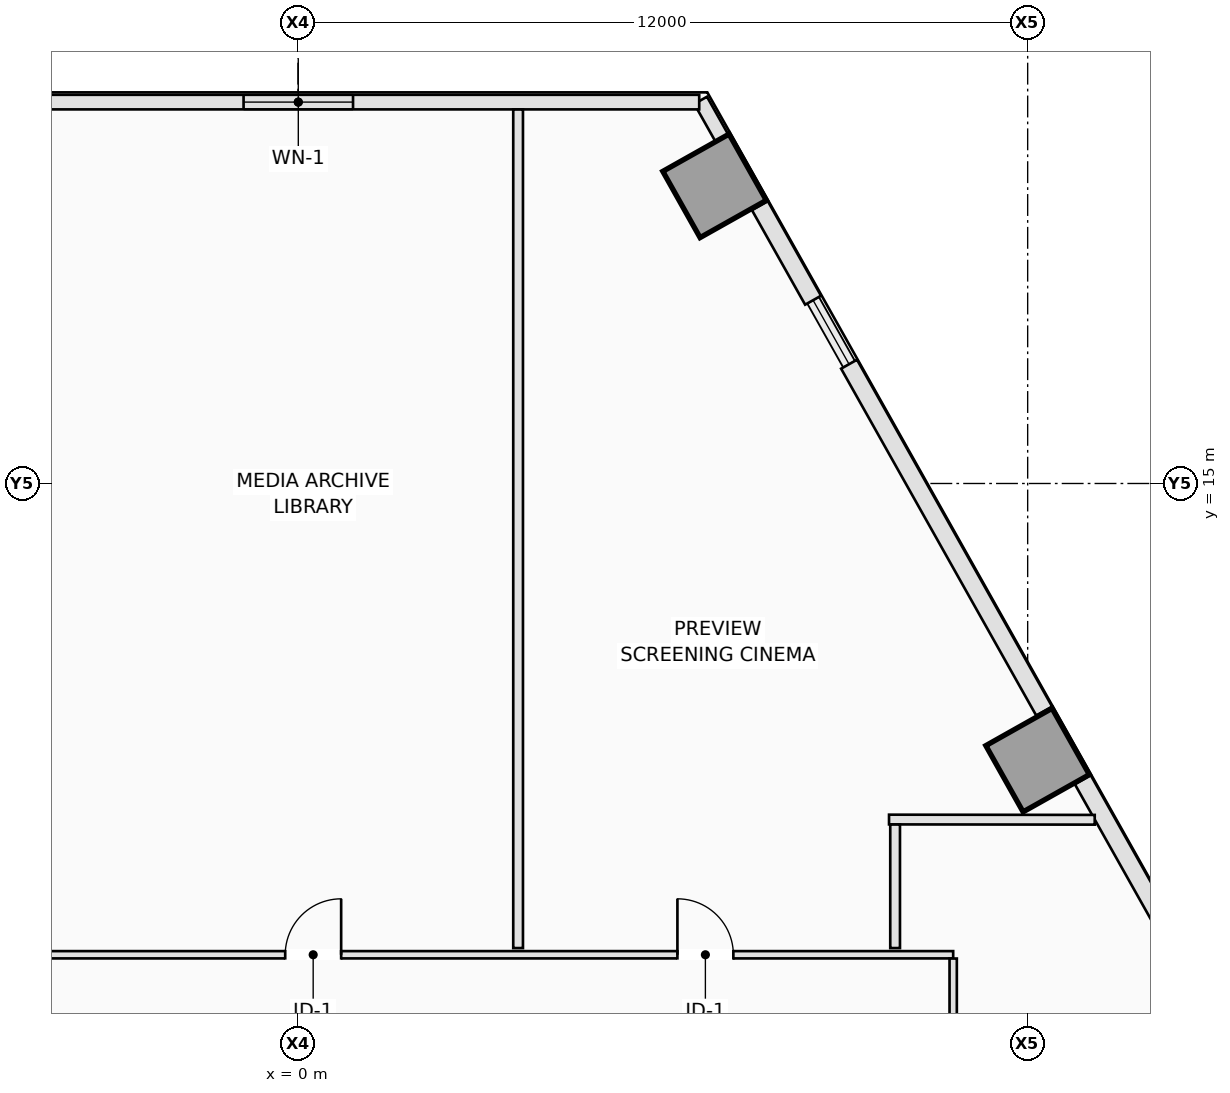
"""IFC4 building model, lengths in metres.
Left out: names, types, materials, properties, quantities, classifications, styles, units other than length and angle.
Written with IfcOpenShell. Run it as: python <this file> out.ifc"""

import sys

from ifc_helpers import new_model, si_unit, direction, frame, frame_2d, origin, origin_2d, place, context, subcontext, project, spatial, rectangle, extrude, element, fill, save


model = new_model("IFC4")
c1 = context("Model", 3, precision=1e-05, world=origin(), true_north=direction((0.0, 1.0)))
c2 = subcontext(c1, "Body", "Model", "MODEL_VIEW")
j1 = project(units=[si_unit("LENGTHUNIT", "METRE"), si_unit("PLANEANGLEUNIT", "RADIAN")], contexts=[c1])
p1 = place(None, origin())
s1 = spatial("IfcSite", under=j1, at=p1, CompositionType="ELEMENT")
p2 = place(p1, origin())
s2 = spatial("IfcBuilding", under=s1, at=p2, CompositionType="ELEMENT")
p3 = place(p2, frame((0.0, 0.0, 45.1)))
s3 = spatial("IfcBuildingStorey", under=s2, at=p3, CompositionType="ELEMENT", Elevation=45.1)
for number, where, z_axis, x_axis in (
    (1, (12.163, 10.451, 0.0), (0.0, 0.0, 1.0), (0.872, 0.49, 0.0)),
    (2, (6.851, 19.895, 0.0), (0.0, 0.0, 1.0), (0.872, 0.49, 0.0)),
):
    element("IfcColumn", number, at=place(p3, frame(where, z_axis=z_axis, x_axis=x_axis)), inside=s3, PredefinedType="COLUMN", context=c2, shape_type="SweptSolid", body=[
        extrude(rectangle(XDim=1.25, YDim=1.25, at=origin_2d()), origin(), (0.0, 0.0, 1.0), 3.5),
    ])
p4 = place(p3, frame((6.622, 21.301, 0.0), z_axis=(0.0, 0.0, 1.0), x_axis=(0.490261239633, -0.871575537125, 0.0)))
e3 = element("IfcWall", 3, at=p4, inside=s3, PredefinedType="STANDARD", context=c2, shape_type="SweptSolid", body=[
    extrude(rectangle(XDim=0.708, YDim=0.24, at=frame_2d((0.354, 0.0))), origin(), (0.0, 0.0, 1.0), 3.25),
])
p5 = place(p3, frame((7.597, 19.569, 0.0), z_axis=(0.0, 0.0, 1.0), x_axis=(0.490215743191, -0.87160112731, 0.0)))
e4 = element("IfcWall", 4, at=p5, inside=s3, PredefinedType="STANDARD", context=c2, shape_type="SweptSolid", body=[
    extrude(rectangle(XDim=1.783, YDim=0.3, at=frame_2d((0.892, 0.0))), origin(), (0.0, 0.0, 1.0), 3.25),
])
p6 = place(p3, frame((9.063, 16.962, 0.0), z_axis=(0.0, 0.0, 1.0), x_axis=(0.490270095534, -0.871570555621, 0.0)))
e5 = element("IfcWall", 5, at=p6, inside=s3, PredefinedType="STANDARD", context=c2, shape_type="SweptSolid", body=[
    extrude(rectangle(XDim=6.544, YDim=0.3, at=frame_2d((3.272, 0.0))), origin(), (0.0, 0.0, 1.0), 3.25),
])
p7 = place(p3, frame((12.906, 10.129, 0.0), z_axis=(0.0, 0.0, 1.0), x_axis=(0.490275749717, -0.871567375043, 0.0)))
e6 = element("IfcWall", 6, at=p7, inside=s3, PredefinedType="STANDARD", context=c2, shape_type="SweptSolid", body=[
    extrude(rectangle(XDim=3.994, YDim=0.3, at=frame_2d((1.997, 0.0))), origin(), (0.0, 0.0, 1.0), 3.25),
])
p8 = place(p3, frame((6.598, 21.272, 0.0), z_axis=(0.0, 0.0, 1.0), x_axis=(-1.0, 0.0, 0.0)))
e7 = element("IfcWall", 7, at=p8, inside=s3, PredefinedType="STANDARD", context=c2, shape_type="SweptSolid", body=[
    extrude(rectangle(XDim=13.187, YDim=0.24, at=frame_2d((6.593, 0.0))), origin(), (0.0, 0.0, 1.0), 3.25),
])
p9 = place(p8, frame((5.693, 0.0, 0.9)))
e8 = element("IfcOpeningElement", 8, at=p9, cuts=e7, PredefinedType="OPENING", context=c2, shape_type="SweptSolid", body=[
    extrude(rectangle(XDim=1.8, YDim=2.1, at=frame_2d((0.9, 1.05))), frame((0.0, 0.13, 0.0), z_axis=(0.0, -1.0, 0.0), x_axis=(1.0, 0.0, 0.0)), (0.0, 0.0, 1.0), 0.26),
])
p10 = place(p3, frame((-10.863, 7.25, 0.0), z_axis=(0.0, 0.0, 1.0), x_axis=(1.0, 0.0, 0.0)))
e9 = element("IfcWall", 9, at=p10, inside=s3, PredefinedType="PARTITIONING", context=c2, shape_type="SweptSolid", body=[
    extrude(rectangle(XDim=21.638, YDim=0.12, at=frame_2d((10.819, 0.0))), origin(), (0.0, 0.0, 1.0), 3.25),
])
p11 = place(p10, frame((10.653, 0.0, 0.0)))
e10 = element("IfcOpeningElement", 10, at=p11, cuts=e9, PredefinedType="OPENING", context=c2, shape_type="SweptSolid", body=[
    extrude(rectangle(XDim=0.92, YDim=2.12, at=frame_2d((0.46, 1.06))), frame((0.0, 0.07, 0.0), z_axis=(0.0, -1.0, 0.0), x_axis=(1.0, 0.0, 0.0)), (0.0, 0.0, 1.0), 0.14),
])
p12 = place(p10, frame((17.103, 0.0, 0.0)))
e11 = element("IfcOpeningElement", 11, at=p12, cuts=e9, PredefinedType="OPENING", context=c2, shape_type="SweptSolid", body=[
    extrude(rectangle(XDim=0.92, YDim=2.12, at=frame_2d((0.46, 1.06))), frame((0.0, 0.07, 0.0), z_axis=(0.0, -1.0, 0.0), x_axis=(1.0, 0.0, 0.0)), (0.0, 0.0, 1.0), 0.14),
])
p13 = place(p3, frame((10.775, 7.188, 0.0), z_axis=(0.0, 0.0, 1.0), x_axis=(0.0, -1.0, 0.0)))
e12 = element("IfcWall", 12, at=p13, inside=s3, PredefinedType="PARTITIONING", context=c2, shape_type="SweptSolid", body=[
    extrude(rectangle(XDim=9.588, YDim=0.12, at=frame_2d((4.794, 0.0))), origin(), (0.0, 0.0, 1.0), 3.25),
])
p14 = place(p13, frame((1.302, 0.0, 0.0)))
e13 = element("IfcOpeningElement", 13, at=p14, cuts=e12, PredefinedType="OPENING", context=c2, shape_type="SweptSolid", body=[
    extrude(rectangle(XDim=0.92, YDim=2.12, at=frame_2d((0.46, 1.06))), frame((0.0, 0.07, 0.0), z_axis=(0.0, -1.0, 0.0), x_axis=(1.0, 0.0, 0.0)), (0.0, 0.0, 1.0), 0.14),
])
p15 = place(p13, frame((4.398, 0.0, 0.0)))
e14 = element("IfcOpeningElement", 14, at=p15, cuts=e12, PredefinedType="OPENING", context=c2, shape_type="SweptSolid", body=[
    extrude(rectangle(XDim=0.92, YDim=2.12, at=frame_2d((0.46, 1.06))), frame((0.0, 0.07, 0.0), z_axis=(0.0, -1.0, 0.0), x_axis=(1.0, 0.0, 0.0)), (0.0, 0.0, 1.0), 0.14),
])
p16 = place(p3, frame((3.62, 21.15, 0.0), z_axis=(0.0, 0.0, 1.0), x_axis=(0.0, -1.0, 0.0)))
e15 = element("IfcWall", 15, at=p16, inside=s3, PredefinedType="PARTITIONING", context=c2, shape_type="SweptSolid", body=[
    extrude(rectangle(XDim=13.79, YDim=0.16, at=frame_2d((6.895, 0.0))), origin(), (0.0, 0.0, 1.0), 3.25),
])
p17 = place(p3, frame((13.103, 9.47, 0.0), z_axis=(0.0, 0.0, 1.0), x_axis=(-0.999999333295, 0.001154733641, 0.0)))
e16 = element("IfcWall", 16, at=p17, inside=s3, PredefinedType="PARTITIONING", context=c2, shape_type="SweptSolid", body=[
    extrude(rectangle(XDim=3.383, YDim=0.16, at=frame_2d((1.691, 0.0))), origin(), (0.0, 0.0, 1.0), 3.25),
])
p18 = place(p3, frame((9.82, 9.392, 0.0), z_axis=(0.0, 0.0, 1.0), x_axis=(0.0, -1.0, 0.0)))
e17 = element("IfcWall", 17, at=p18, inside=s3, PredefinedType="PARTITIONING", context=c2, shape_type="SweptSolid", body=[
    extrude(rectangle(XDim=2.031, YDim=0.16, at=frame_2d((1.016, 0.0))), origin(), (0.0, 0.0, 1.0), 3.25),
])
p19 = place(p9, origin())
e18 = element("IfcWindow", 18, at=p19, inside=s3, PartitioningType="SINGLE_PANEL", PredefinedType="WINDOW", context=c2, shape_type="SweptSolid", body=[
    extrude(rectangle(XDim=1.8, YDim=2.1, at=frame_2d((0.9, 1.05))), frame((0.0, 0.03, 0.0), z_axis=(0.0, -1.0, 0.0), x_axis=(1.0, 0.0, 0.0)), (0.0, 0.0, 1.0), 0.06),
])
fill(e8, e18)
p20 = place(p11, origin())
e19 = element("IfcDoor", 19, at=p20, inside=s3, OperationType="SINGLE_SWING_RIGHT", PredefinedType="DOOR", context=c2, shape_type="SweptSolid", body=[
    extrude(rectangle(XDim=0.92, YDim=2.12, at=frame_2d((0.46, 1.06))), frame((0.0, 0.025, 0.0), z_axis=(0.0, -1.0, 0.0), x_axis=(1.0, 0.0, 0.0)), (0.0, 0.0, 1.0), 0.05),
])
fill(e10, e19)
p21 = place(p12, origin())
e20 = element("IfcDoor", 20, at=p21, inside=s3, OperationType="SINGLE_SWING_LEFT", PredefinedType="DOOR", context=c2, shape_type="SweptSolid", body=[
    extrude(rectangle(XDim=0.92, YDim=2.12, at=frame_2d((0.46, 1.06))), frame((0.0, 0.025, 0.0), z_axis=(0.0, -1.0, 0.0), x_axis=(1.0, 0.0, 0.0)), (0.0, 0.0, 1.0), 0.05),
])
fill(e11, e20)
save(model, sys.argv[1])
